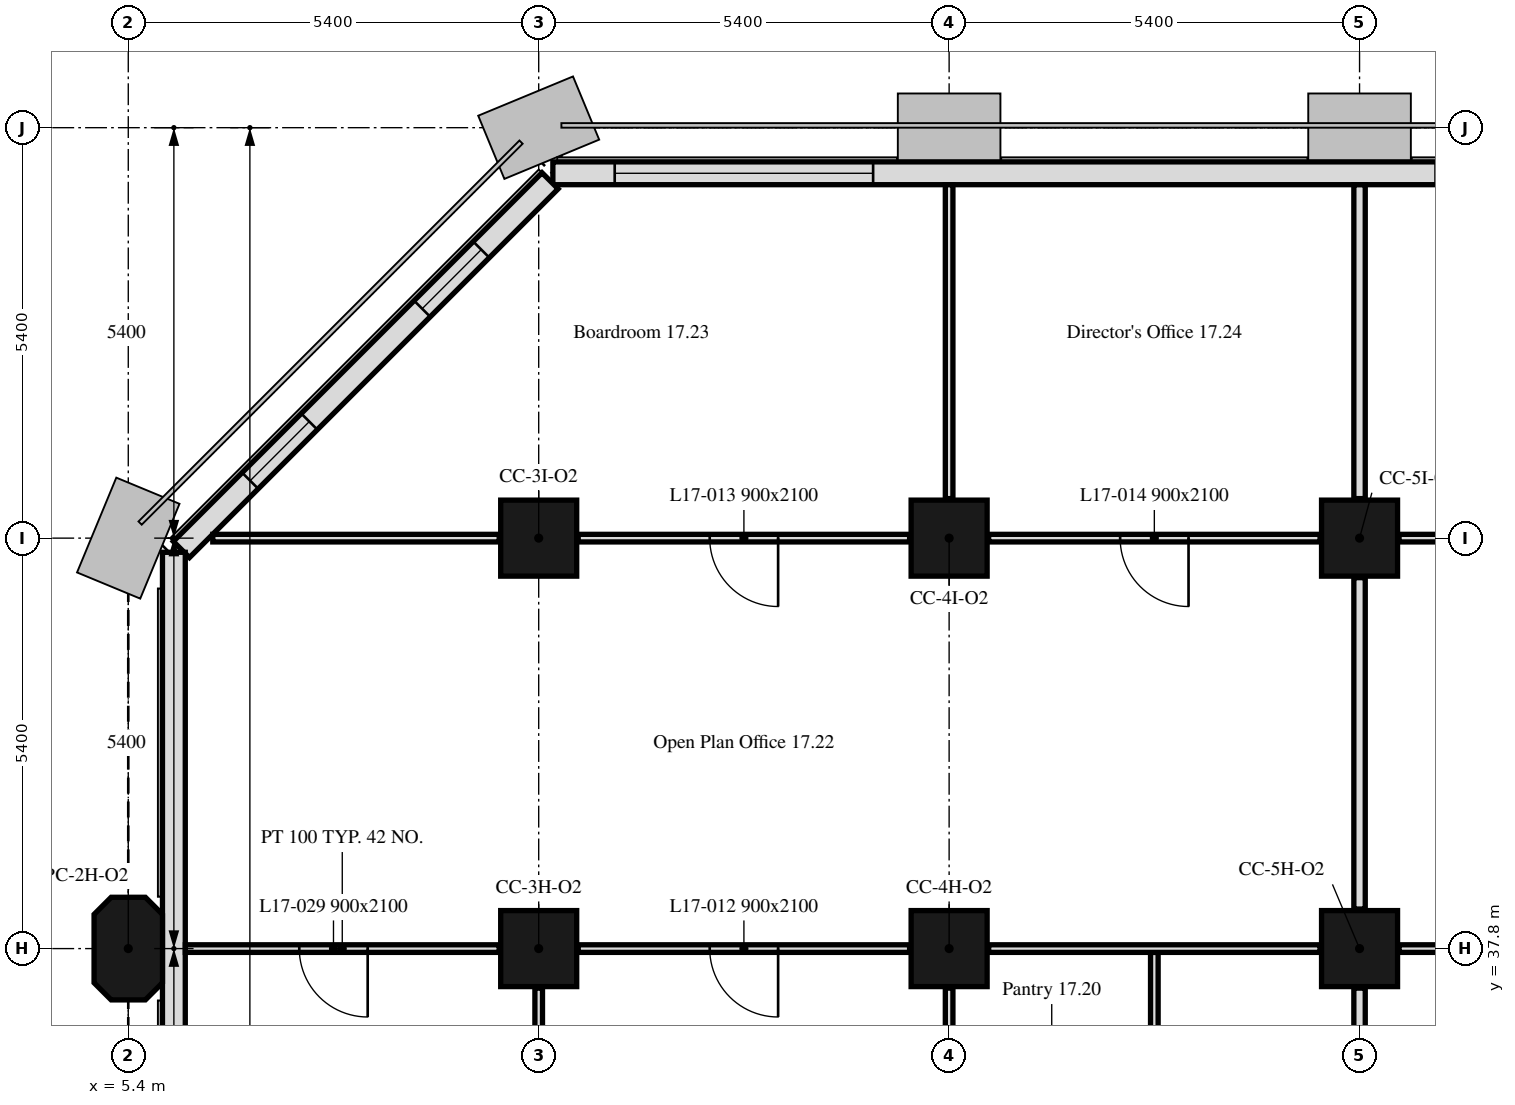
"""IFC4 building model, lengths in metres.
Left out: names, types, materials, properties, quantities, classifications, styles, units other than length and angle.
Written with IfcOpenShell. Run it as: python <this file> out.ifc"""

import sys

from ifc_helpers import new_model, si_unit, direction, frame, frame_2d, origin, origin_2d, place, context, subcontext, project, spatial, polyline, rectangle, outline, extrude, element, fill, save


model = new_model("IFC4")
c1 = context("Model", 3, precision=1e-05, world=origin(), true_north=direction((0.0, 1.0)))
c2 = subcontext(c1, "Body", "Model", "MODEL_VIEW")
j1 = project(units=[si_unit("LENGTHUNIT", "METRE"), si_unit("PLANEANGLEUNIT", "RADIAN")], contexts=[c1])
p1 = place(None, origin())
s1 = spatial("IfcSite", under=j1, at=p1, CompositionType="ELEMENT")
p2 = place(p1, origin())
s2 = spatial("IfcBuilding", under=s1, at=p2, CompositionType="ELEMENT")
p3 = place(p2, frame((0.0, 0.0, 76.4)))
s3 = spatial("IfcBuildingStorey", under=s2, at=p3, CompositionType="ELEMENT", Elevation=76.4)
p4 = place(p3, frame((5.4, 37.8, 0.0), z_axis=(0.0, 0.0, 1.0), x_axis=(0.0, 1.0, 0.0)))
e1 = element("IfcColumn", 1, at=p4, inside=s3, PredefinedType="COLUMN", context=c2, shape_type="SweptSolid", body=[
    extrude(outline(polyline([(-0.45, -0.45), (0.45, -0.45), (0.675, -0.225), (0.675, 0.225), (0.45, 0.45), (-0.45, 0.45), (-0.675, 0.225), (-0.675, -0.225), (-0.45, -0.45)])), origin(), (0.0, 0.0, 1.0), 3.5),
])
for number, where, z_axis, x_axis in (
    (2, (10.8, 37.8, 0.0), (0.0, 0.0, 1.0), (1.0, 0.0, 0.0)),
    (3, (16.2, 37.8, 0.0), (0.0, 0.0, 1.0), (1.0, 0.0, 0.0)),
    (4, (21.6, 37.8, 0.0), (0.0, 0.0, 1.0), (1.0, 0.0, 0.0)),
    (5, (10.8, 43.2, 0.0), (0.0, 0.0, 1.0), (1.0, 0.0, 0.0)),
    (6, (16.2, 43.2, 0.0), (0.0, 0.0, 1.0), (1.0, 0.0, 0.0)),
    (7, (21.6, 43.2, 0.0), (0.0, 0.0, 1.0), (1.0, 0.0, 0.0)),
):
    element("IfcColumn", number, at=place(p3, frame(where, z_axis=z_axis, x_axis=x_axis)), inside=s3, PredefinedType="COLUMN", context=c2, shape_type="SweptSolid", body=[
        extrude(rectangle(XDim=1.0, YDim=1.0, at=origin_2d()), origin(), (0.0, 0.0, 1.0), 3.5),
    ])
p5 = place(p3, frame((43.014, 48.0, 0.0), z_axis=(0.0, 0.0, 1.0), x_axis=(-1.0, 0.0, 0.0)))
e8 = element("IfcWall", 8, at=p5, inside=s3, PredefinedType="SOLIDWALL", context=c2, shape_type="SweptSolid", body=[
    extrude(rectangle(XDim=32.027, YDim=0.3, at=frame_2d((16.014, 0.0))), origin(), (0.0, 0.0, 1.0), 3.5),
])
p6 = place(p5, frame((6.214, 0.0, 0.9)))
e9 = element("IfcOpeningElement", 9, at=p6, cuts=e8, PredefinedType="OPENING", context=c2, shape_type="SweptSolid", body=[
    extrude(rectangle(XDim=3.4, YDim=1.7, at=frame_2d((1.7, 0.85))), frame((0.0, 0.16, 0.0), z_axis=(0.0, -1.0, 0.0), x_axis=(1.0, 0.0, 0.0)), (0.0, 0.0, 1.0), 0.32),
])
p7 = place(p5, frame((17.014, 0.0, 0.9)))
e10 = element("IfcOpeningElement", 10, at=p7, cuts=e8, PredefinedType="OPENING", context=c2, shape_type="SweptSolid", body=[
    extrude(rectangle(XDim=3.4, YDim=1.7, at=frame_2d((1.7, 0.85))), frame((0.0, 0.16, 0.0), z_axis=(0.0, -1.0, 0.0), x_axis=(1.0, 0.0, 0.0)), (0.0, 0.0, 1.0), 0.32),
])
p8 = place(p5, frame((27.814, 0.0, 0.9)))
e11 = element("IfcOpeningElement", 11, at=p8, cuts=e8, PredefinedType="OPENING", context=c2, shape_type="SweptSolid", body=[
    extrude(rectangle(XDim=3.4, YDim=1.7, at=frame_2d((1.7, 0.85))), frame((0.0, 0.16, 0.0), z_axis=(0.0, -1.0, 0.0), x_axis=(1.0, 0.0, 0.0)), (0.0, 0.0, 1.0), 0.32),
])
p9 = place(p3, frame((10.949, 47.901, 0.0), z_axis=(0.0, 0.0, 1.0), x_axis=(-0.707106781187, -0.707106781187, 0.0)))
e12 = element("IfcWall", 12, at=p9, inside=s3, PredefinedType="SOLIDWALL", context=c2, shape_type="SweptSolid", body=[
    extrude(rectangle(XDim=6.86, YDim=0.3, at=frame_2d((3.43, 0.0))), origin(), (0.0, 0.0, 1.0), 3.5),
])
p10 = place(p9, frame((1.28, 0.0, 0.9)))
e13 = element("IfcOpeningElement", 13, at=p10, cuts=e12, PredefinedType="OPENING", context=c2, shape_type="SweptSolid", body=[
    extrude(rectangle(XDim=1.1, YDim=1.7, at=frame_2d((0.55, 0.85))), frame((0.0, 0.16, 0.0), z_axis=(0.0, -1.0, 0.0), x_axis=(1.0, 0.0, 0.0)), (0.0, 0.0, 1.0), 0.32),
])
p11 = place(p9, frame((4.48, 0.0, 0.9)))
e14 = element("IfcOpeningElement", 14, at=p11, cuts=e12, PredefinedType="OPENING", context=c2, shape_type="SweptSolid", body=[
    extrude(rectangle(XDim=1.1, YDim=1.7, at=frame_2d((0.55, 0.85))), frame((0.0, 0.16, 0.0), z_axis=(0.0, -1.0, 0.0), x_axis=(1.0, 0.0, 0.0)), (0.0, 0.0, 1.0), 0.32),
])
p12 = place(p3, frame((6.0, 43.014, 0.0), z_axis=(0.0, 0.0, 1.0), x_axis=(0.0, -1.0, 0.0)))
e15 = element("IfcWall", 15, at=p12, inside=s3, PredefinedType="SOLIDWALL", context=c2, shape_type="SweptSolid", body=[
    extrude(rectangle(XDim=10.614, YDim=0.3, at=frame_2d((5.307, 0.0))), origin(), (0.0, 0.0, 1.0), 3.5),
])
p13 = place(p12, frame((6.564, 0.0, 0.9)))
e16 = element("IfcOpeningElement", 16, at=p13, cuts=e15, PredefinedType="OPENING", context=c2, shape_type="SweptSolid", body=[
    extrude(rectangle(XDim=1.1, YDim=1.7, at=frame_2d((0.55, 0.85))), frame((0.0, 0.16, 0.0), z_axis=(0.0, -1.0, 0.0), x_axis=(1.0, 0.0, 0.0)), (0.0, 0.0, 1.0), 0.32),
])
p14 = place(p12, frame((8.164, 0.0, 0.9)))
e17 = element("IfcOpeningElement", 17, at=p14, cuts=e15, PredefinedType="OPENING", context=c2, shape_type="SweptSolid", body=[
    extrude(rectangle(XDim=1.1, YDim=1.7, at=frame_2d((0.55, 0.85))), frame((0.0, 0.16, 0.0), z_axis=(0.0, -1.0, 0.0), x_axis=(1.0, 0.0, 0.0)), (0.0, 0.0, 1.0), 0.32),
])
p15 = place(p3, frame((10.28, 37.8, 0.0), z_axis=(0.0, 0.0, 1.0), x_axis=(-1.0, 0.0, 0.0)))
e18 = element("IfcWall", 18, at=p15, inside=s3, PredefinedType="PARTITIONING", context=c2, shape_type="SweptSolid", body=[
    extrude(rectangle(XDim=4.129, YDim=0.1, at=frame_2d((2.064, 0.0))), origin(), (0.0, 0.0, 1.0), 3.5),
])
p16 = place(p15, frame((1.73, 0.0, 0.0)))
e19 = element("IfcOpeningElement", 19, at=p16, cuts=e18, PredefinedType="OPENING", context=c2, shape_type="SweptSolid", body=[
    extrude(rectangle(XDim=0.9, YDim=2.1, at=frame_2d((0.45, 1.05))), frame((0.0, 0.05, 0.0), z_axis=(0.0, -1.0, 0.0), x_axis=(1.0, 0.0, 0.0)), (0.0, 0.0, 1.0), 0.1),
])
p17 = place(p3, frame((10.8, 35.175, 0.0), z_axis=(0.0, 0.0, 1.0), x_axis=(0.0, 1.0, 0.0)))
e20 = element("IfcWall", 20, at=p17, inside=s3, PredefinedType="PARTITIONING", context=c2, shape_type="SweptSolid", body=[
    extrude(rectangle(XDim=2.105, YDim=0.1, at=frame_2d((1.052, 0.0))), origin(), (0.0, 0.0, 1.0), 3.5),
])
p18 = place(p3, frame((16.2, 35.175, 0.0), z_axis=(0.0, 0.0, 1.0), x_axis=(0.0, 1.0, 0.0)))
e21 = element("IfcWall", 21, at=p18, inside=s3, PredefinedType="PARTITIONING", context=c2, shape_type="SweptSolid", body=[
    extrude(rectangle(XDim=2.105, YDim=0.1, at=frame_2d((1.052, 0.0))), origin(), (0.0, 0.0, 1.0), 2.75),
])
p19 = place(p3, frame((15.68, 37.8, 0.0), z_axis=(0.0, 0.0, 1.0), x_axis=(-1.0, 0.0, 0.0)))
e22 = element("IfcWall", 22, at=p19, inside=s3, PredefinedType="PARTITIONING", context=c2, shape_type="SweptSolid", body=[
    extrude(rectangle(XDim=4.36, YDim=0.1, at=frame_2d((2.18, 0.0))), origin(), (0.0, 0.0, 1.0), 3.5),
])
p20 = place(p19, frame((1.73, 0.0, 0.0)))
e23 = element("IfcOpeningElement", 23, at=p20, cuts=e22, PredefinedType="OPENING", context=c2, shape_type="SweptSolid", body=[
    extrude(rectangle(XDim=0.9, YDim=2.1, at=frame_2d((0.45, 1.05))), frame((0.0, 0.05, 0.0), z_axis=(0.0, -1.0, 0.0), x_axis=(1.0, 0.0, 0.0)), (0.0, 0.0, 1.0), 0.1),
])
p21 = place(p3, frame((18.9, 35.175, 0.0), z_axis=(0.0, 0.0, 1.0), x_axis=(0.0, 1.0, 0.0)))
e24 = element("IfcWall", 24, at=p21, inside=s3, PredefinedType="PARTITIONING", context=c2, shape_type="SweptSolid", body=[
    extrude(rectangle(XDim=2.575, YDim=0.1, at=frame_2d((1.288, 0.0))), origin(), (0.0, 0.0, 1.0), 3.5),
])
p22 = place(p3, frame((21.6, 35.175, 0.0), z_axis=(0.0, 0.0, 1.0), x_axis=(0.0, 1.0, 0.0)))
e25 = element("IfcWall", 25, at=p22, inside=s3, PredefinedType="PARTITIONING", context=c2, shape_type="SweptSolid", body=[
    extrude(rectangle(XDim=2.105, YDim=0.15, at=frame_2d((1.052, 0.0))), origin(), (0.0, 0.0, 1.0), 2.75),
])
p23 = place(p3, frame((21.08, 37.8, 0.0), z_axis=(0.0, 0.0, 1.0), x_axis=(-1.0, 0.0, 0.0)))
e26 = element("IfcWall", 26, at=p23, inside=s3, PredefinedType="PARTITIONING", context=c2, shape_type="SweptSolid", body=[
    extrude(rectangle(XDim=4.36, YDim=0.1, at=frame_2d((2.18, 0.0))), origin(), (0.0, 0.0, 1.0), 3.5),
])
p24 = place(p3, frame((21.08, 43.2, 0.0), z_axis=(0.0, 0.0, 1.0), x_axis=(-1.0, 0.0, 0.0)))
e27 = element("IfcWall", 27, at=p24, inside=s3, PredefinedType="PARTITIONING", context=c2, shape_type="SweptSolid", body=[
    extrude(rectangle(XDim=4.36, YDim=0.1, at=frame_2d((2.18, 0.0))), origin(), (0.0, 0.0, 1.0), 3.5),
])
p25 = place(p24, frame((1.73, 0.0, 0.0)))
e28 = element("IfcOpeningElement", 28, at=p25, cuts=e27, PredefinedType="OPENING", context=c2, shape_type="SweptSolid", body=[
    extrude(rectangle(XDim=0.9, YDim=2.1, at=frame_2d((0.45, 1.05))), frame((0.0, 0.05, 0.0), z_axis=(0.0, -1.0, 0.0), x_axis=(1.0, 0.0, 0.0)), (0.0, 0.0, 1.0), 0.1),
])
p26 = place(p3, frame((15.68, 43.2, 0.0), z_axis=(0.0, 0.0, 1.0), x_axis=(-1.0, 0.0, 0.0)))
e29 = element("IfcWall", 29, at=p26, inside=s3, PredefinedType="PARTITIONING", context=c2, shape_type="SweptSolid", body=[
    extrude(rectangle(XDim=4.36, YDim=0.1, at=frame_2d((2.18, 0.0))), origin(), (0.0, 0.0, 1.0), 3.5),
])
p27 = place(p26, frame((1.73, 0.0, 0.0)))
e30 = element("IfcOpeningElement", 30, at=p27, cuts=e29, PredefinedType="OPENING", context=c2, shape_type="SweptSolid", body=[
    extrude(rectangle(XDim=0.9, YDim=2.1, at=frame_2d((0.45, 1.05))), frame((0.0, 0.05, 0.0), z_axis=(0.0, -1.0, 0.0), x_axis=(1.0, 0.0, 0.0)), (0.0, 0.0, 1.0), 0.1),
])
p28 = place(p3, frame((10.28, 43.2, 0.0), z_axis=(0.0, 0.0, 1.0), x_axis=(-1.0, 0.0, 0.0)))
e31 = element("IfcWall", 31, at=p28, inside=s3, PredefinedType="PARTITIONING", context=c2, shape_type="SweptSolid", body=[
    extrude(rectangle(XDim=3.768, YDim=0.1, at=frame_2d((1.884, 0.0))), origin(), (0.0, 0.0, 1.0), 3.5),
])
p29 = place(p3, frame((21.6, 38.32, 0.0), z_axis=(0.0, 0.0, 1.0), x_axis=(0.0, 1.0, 0.0)))
e32 = element("IfcWall", 32, at=p29, inside=s3, PredefinedType="PARTITIONING", context=c2, shape_type="SweptSolid", body=[
    extrude(rectangle(XDim=4.36, YDim=0.15, at=frame_2d((2.18, 0.0))), origin(), (0.0, 0.0, 1.0), 2.75),
])
p30 = place(p3, frame((16.2, 43.72, 0.0), z_axis=(0.0, 0.0, 1.0), x_axis=(0.0, 1.0, 0.0)))
e33 = element("IfcWall", 33, at=p30, inside=s3, PredefinedType="PARTITIONING", context=c2, shape_type="SweptSolid", body=[
    extrude(rectangle(XDim=4.129, YDim=0.1, at=frame_2d((2.064, 0.0))), origin(), (0.0, 0.0, 1.0), 2.75),
])
p31 = place(p3, frame((21.6, 43.72, 0.0), z_axis=(0.0, 0.0, 1.0), x_axis=(0.0, 1.0, 0.0)))
e34 = element("IfcWall", 34, at=p31, inside=s3, PredefinedType="PARTITIONING", context=c2, shape_type="SweptSolid", body=[
    extrude(rectangle(XDim=4.129, YDim=0.15, at=frame_2d((2.064, 0.0))), origin(), (0.0, 0.0, 1.0), 2.75),
])
p32 = place(p3, frame((26.48, 37.8, 0.0), z_axis=(0.0, 0.0, 1.0), x_axis=(-1.0, 0.0, 0.0)))
e35 = element("IfcWall", 35, at=p32, inside=s3, PredefinedType="PARTITIONING", context=c2, shape_type="SweptSolid", body=[
    extrude(rectangle(XDim=4.36, YDim=0.1, at=frame_2d((2.18, 0.0))), origin(), (0.0, 0.0, 1.0), 3.5),
])
p33 = place(p32, frame((1.73, 0.0, 0.0)))
e36 = element("IfcOpeningElement", 36, at=p33, cuts=e35, PredefinedType="OPENING", context=c2, shape_type="SweptSolid", body=[
    extrude(rectangle(XDim=0.9, YDim=2.1, at=frame_2d((0.45, 1.05))), frame((0.0, 0.05, 0.0), z_axis=(0.0, -1.0, 0.0), x_axis=(1.0, 0.0, 0.0)), (0.0, 0.0, 1.0), 0.1),
])
p34 = place(p3, frame((26.48, 43.2, 0.0), z_axis=(0.0, 0.0, 1.0), x_axis=(-1.0, 0.0, 0.0)))
e37 = element("IfcWall", 37, at=p34, inside=s3, PredefinedType="PARTITIONING", context=c2, shape_type="SweptSolid", body=[
    extrude(rectangle(XDim=4.36, YDim=0.1, at=frame_2d((2.18, 0.0))), origin(), (0.0, 0.0, 1.0), 3.5),
])
p35 = place(p34, frame((1.73, 0.0, 0.0)))
e38 = element("IfcOpeningElement", 38, at=p35, cuts=e37, PredefinedType="OPENING", context=c2, shape_type="SweptSolid", body=[
    extrude(rectangle(XDim=0.9, YDim=2.1, at=frame_2d((0.45, 1.05))), frame((0.0, 0.05, 0.0), z_axis=(0.0, -1.0, 0.0), x_axis=(1.0, 0.0, 0.0)), (0.0, 0.0, 1.0), 0.1),
])
p36 = place(p8, origin())
e39 = element("IfcWindow", 39, at=p36, inside=s3, PartitioningType="SINGLE_PANEL", PredefinedType="WINDOW", context=c2, shape_type="SweptSolid", body=[
    extrude(rectangle(XDim=3.4, YDim=1.7, at=frame_2d((1.7, 0.85))), frame((0.0, 0.03, 0.0), z_axis=(0.0, -1.0, 0.0), x_axis=(1.0, 0.0, 0.0)), (0.0, 0.0, 1.0), 0.06),
])
fill(e11, e39)
p37 = place(p10, origin())
e40 = element("IfcWindow", 40, at=p37, inside=s3, PartitioningType="SINGLE_PANEL", PredefinedType="WINDOW", context=c2, shape_type="SweptSolid", body=[
    extrude(rectangle(XDim=1.1, YDim=1.7, at=frame_2d((0.55, 0.85))), frame((0.0, 0.03, 0.0), z_axis=(0.0, -1.0, 0.0), x_axis=(1.0, 0.0, 0.0)), (0.0, 0.0, 1.0), 0.06),
])
fill(e13, e40)
p38 = place(p11, origin())
e41 = element("IfcWindow", 41, at=p38, inside=s3, PartitioningType="SINGLE_PANEL", PredefinedType="WINDOW", context=c2, shape_type="SweptSolid", body=[
    extrude(rectangle(XDim=1.1, YDim=1.7, at=frame_2d((0.55, 0.85))), frame((0.0, 0.03, 0.0), z_axis=(0.0, -1.0, 0.0), x_axis=(1.0, 0.0, 0.0)), (0.0, 0.0, 1.0), 0.06),
])
fill(e14, e41)
p39 = place(p20, origin())
e42 = element("IfcDoor", 42, at=p39, inside=s3, OperationType="SINGLE_SWING_LEFT", PredefinedType="DOOR", context=c2, shape_type="SweptSolid", body=[
    extrude(rectangle(XDim=0.9, YDim=2.1, at=frame_2d((0.45, 1.05))), frame((0.0, 0.025, 0.0), z_axis=(0.0, -1.0, 0.0), x_axis=(1.0, 0.0, 0.0)), (0.0, 0.0, 1.0), 0.05),
])
fill(e23, e42)
p40 = place(p27, origin())
e43 = element("IfcDoor", 43, at=p40, inside=s3, OperationType="SINGLE_SWING_LEFT", PredefinedType="DOOR", context=c2, shape_type="SweptSolid", body=[
    extrude(rectangle(XDim=0.9, YDim=2.1, at=frame_2d((0.45, 1.05))), frame((0.0, 0.025, 0.0), z_axis=(0.0, -1.0, 0.0), x_axis=(1.0, 0.0, 0.0)), (0.0, 0.0, 1.0), 0.05),
])
fill(e30, e43)
p41 = place(p25, origin())
e44 = element("IfcDoor", 44, at=p41, inside=s3, OperationType="SINGLE_SWING_LEFT", PredefinedType="DOOR", context=c2, shape_type="SweptSolid", body=[
    extrude(rectangle(XDim=0.9, YDim=2.1, at=frame_2d((0.45, 1.05))), frame((0.0, 0.025, 0.0), z_axis=(0.0, -1.0, 0.0), x_axis=(1.0, 0.0, 0.0)), (0.0, 0.0, 1.0), 0.05),
])
fill(e28, e44)
p42 = place(p16, origin())
e45 = element("IfcDoor", 45, at=p42, inside=s3, OperationType="SINGLE_SWING_RIGHT", PredefinedType="DOOR", context=c2, shape_type="SweptSolid", body=[
    extrude(rectangle(XDim=0.9, YDim=2.1, at=frame_2d((0.45, 1.05))), frame((0.0, 0.025, 0.0), z_axis=(0.0, -1.0, 0.0), x_axis=(1.0, 0.0, 0.0)), (0.0, 0.0, 1.0), 0.05),
])
fill(e19, e45)
save(model, sys.argv[1])
